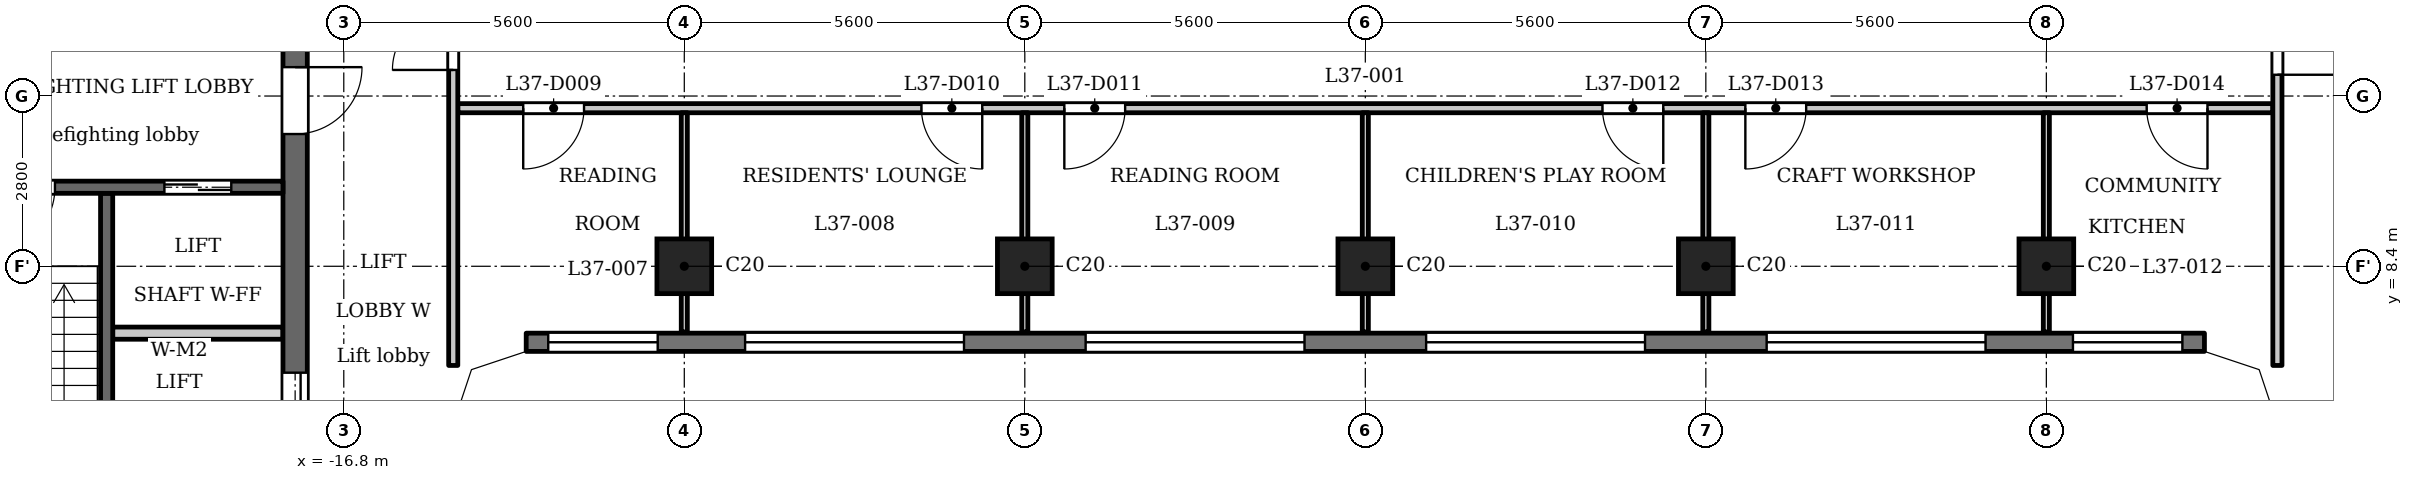
"""IFC4 building model, lengths in metres.
Left out: names, types, materials, properties, quantities, classifications, styles, units other than length and angle.
Written with IfcOpenShell. Run it as: python <this file> out.ifc"""

import sys

from ifc_helpers import new_model, si_unit, direction, frame, frame_2d, origin, origin_2d, place, context, subcontext, project, spatial, polyline, rectangle, outline, extrude, element, fill, save


model = new_model("IFC4")
c1 = context("Model", 3, precision=1e-05, world=origin(), true_north=direction((0.0, 1.0)))
c2 = subcontext(c1, "Body", "Model", "MODEL_VIEW")
j1 = project(units=[si_unit("LENGTHUNIT", "METRE"), si_unit("PLANEANGLEUNIT", "RADIAN")], contexts=[c1])
p1 = place(None, origin())
s1 = spatial("IfcSite", under=j1, at=p1, CompositionType="ELEMENT")
p2 = place(p1, origin())
s2 = spatial("IfcBuilding", under=s1, at=p2, CompositionType="ELEMENT")
p3 = place(p2, frame((0.0, 0.0, 146.6)))
s3 = spatial("IfcBuildingStorey", under=s2, at=p3, CompositionType="ELEMENT", Elevation=146.6)
for number, where, z_axis, x_axis in (
    (1, (-11.2, 8.4, 0.0), (0.0, 0.0, 1.0), (1.0, 0.0, 0.0)),
    (2, (-5.6, 8.4, 0.0), (0.0, 0.0, 1.0), (1.0, 0.0, 0.0)),
    (3, (0.0, 8.4, 0.0), (0.0, 0.0, 1.0), (1.0, 0.0, 0.0)),
    (4, (5.6, 8.4, 0.0), (0.0, 0.0, 1.0), (1.0, 0.0, 0.0)),
    (5, (11.2, 8.4, 0.0), (0.0, 0.0, 1.0), (1.0, 0.0, 0.0)),
):
    element("IfcColumn", number, at=place(p3, frame(where, z_axis=z_axis, x_axis=x_axis)), inside=s3, PredefinedType="COLUMN", context=c2, shape_type="SweptSolid", body=[
        extrude(rectangle(XDim=0.9, YDim=0.9, at=origin_2d()), origin(), (0.0, 0.0, 1.0), 3.5),
    ])
p4 = place(p3, frame((-13.8, 7.15, 0.0), z_axis=(0.0, 0.0, 1.0), x_axis=(1.0, 0.0, 0.0)))
e6 = element("IfcWall", 6, at=p4, inside=s3, PredefinedType="SOLIDWALL", context=c2, shape_type="SweptSolid", body=[
    extrude(rectangle(XDim=27.6, YDim=0.3, at=frame_2d((13.8, 0.0))), origin(), (0.0, 0.0, 1.0), 3.2),
])
p5 = place(p4, frame((0.363, 0.0, 0.9)))
e7 = element("IfcOpeningElement", 7, at=p5, cuts=e6, PredefinedType="OPENING", context=c2, shape_type="SweptSolid", body=[
    extrude(rectangle(XDim=1.8, YDim=1.25, at=frame_2d((0.9, 0.625))), frame((0.0, 0.16, 0.0), z_axis=(0.0, -1.0, 0.0), x_axis=(1.0, 0.0, 0.0)), (0.0, 0.0, 1.0), 0.32),
])
p6 = place(p4, frame((3.6, 0.0, 1.2)))
e8 = element("IfcOpeningElement", 8, at=p6, cuts=e6, PredefinedType="OPENING", context=c2, shape_type="SweptSolid", body=[
    extrude(rectangle(XDim=3.6, YDim=0.95, at=frame_2d((1.8, 0.475))), frame((0.0, 0.16, 0.0), z_axis=(0.0, -1.0, 0.0), x_axis=(1.0, 0.0, 0.0)), (0.0, 0.0, 1.0), 0.32),
])
p7 = place(p4, frame((9.2, 0.0, 1.2)))
e9 = element("IfcOpeningElement", 9, at=p7, cuts=e6, PredefinedType="OPENING", context=c2, shape_type="SweptSolid", body=[
    extrude(rectangle(XDim=3.6, YDim=0.95, at=frame_2d((1.8, 0.475))), frame((0.0, 0.16, 0.0), z_axis=(0.0, -1.0, 0.0), x_axis=(1.0, 0.0, 0.0)), (0.0, 0.0, 1.0), 0.32),
])
p8 = place(p4, frame((14.8, 0.0, 1.2)))
e10 = element("IfcOpeningElement", 10, at=p8, cuts=e6, PredefinedType="OPENING", context=c2, shape_type="SweptSolid", body=[
    extrude(rectangle(XDim=3.6, YDim=0.95, at=frame_2d((1.8, 0.475))), frame((0.0, 0.16, 0.0), z_axis=(0.0, -1.0, 0.0), x_axis=(1.0, 0.0, 0.0)), (0.0, 0.0, 1.0), 0.32),
])
p9 = place(p4, frame((20.4, 0.0, 1.2)))
e11 = element("IfcOpeningElement", 11, at=p9, cuts=e6, PredefinedType="OPENING", context=c2, shape_type="SweptSolid", body=[
    extrude(rectangle(XDim=3.6, YDim=0.95, at=frame_2d((1.8, 0.475))), frame((0.0, 0.16, 0.0), z_axis=(0.0, -1.0, 0.0), x_axis=(1.0, 0.0, 0.0)), (0.0, 0.0, 1.0), 0.32),
])
p10 = place(p4, frame((25.438, 0.0, 0.9)))
e12 = element("IfcOpeningElement", 12, at=p10, cuts=e6, PredefinedType="OPENING", context=c2, shape_type="SweptSolid", body=[
    extrude(rectangle(XDim=1.8, YDim=1.25, at=frame_2d((0.9, 0.625))), frame((0.0, 0.16, 0.0), z_axis=(0.0, -1.0, 0.0), x_axis=(1.0, 0.0, 0.0)), (0.0, 0.0, 1.0), 0.32),
])
p11 = place(p3, frame((-20.7, 2.6, 0.0), z_axis=(0.0, 0.0, 1.0), x_axis=(0.0, 1.0, 0.0)))
e13 = element("IfcWall", 13, at=p11, inside=s3, PredefinedType="SHEAR", context=c2, shape_type="SweptSolid", body=[
    extrude(rectangle(XDim=7.0, YDim=0.2, at=frame_2d((3.5, 0.0))), origin(), (0.0, 0.0, 1.0), 3.2),
])
p12 = place(p3, frame((-17.6, -12.45, 0.0), z_axis=(0.0, 0.0, 1.0), x_axis=(0.0, 1.0, 0.0)))
e14 = element("IfcWall", 14, at=p12, inside=s3, PredefinedType="SHEAR", context=c2, shape_type="SweptSolid", body=[
    extrude(rectangle(XDim=24.9, YDim=0.4, at=frame_2d((12.45, 0.0))), origin(), (0.0, 0.0, 1.0), 3.2),
])
p13 = place(p12, frame((6.325, 0.0, 0.0)))
e15 = element("IfcOpeningElement", 15, at=p13, cuts=e14, PredefinedType="OPENING", context=c2, shape_type="SweptSolid", body=[
    extrude(rectangle(XDim=0.9, YDim=2.1, at=frame_2d((0.45, 1.05))), frame((0.0, 0.21, 0.0), z_axis=(0.0, -1.0, 0.0), x_axis=(1.0, 0.0, 0.0)), (0.0, 0.0, 1.0), 0.42),
])
p14 = place(p12, frame((9.925, 0.0, 0.0)))
e16 = element("IfcOpeningElement", 16, at=p14, cuts=e14, PredefinedType="OPENING", context=c2, shape_type="SweptSolid", body=[
    extrude(rectangle(XDim=0.9, YDim=2.1, at=frame_2d((0.45, 1.05))), frame((0.0, 0.21, 0.0), z_axis=(0.0, -1.0, 0.0), x_axis=(1.0, 0.0, 0.0)), (0.0, 0.0, 1.0), 0.42),
])
p15 = place(p12, frame((15.6, 0.0, 0.0)))
e17 = element("IfcOpeningElement", 17, at=p15, cuts=e14, PredefinedType="OPENING", context=c2, shape_type="SweptSolid", body=[
    extrude(rectangle(XDim=1.1, YDim=2.1, at=frame_2d((0.55, 1.05))), frame((0.0, 0.21, 0.0), z_axis=(0.0, -1.0, 0.0), x_axis=(1.0, 0.0, 0.0)), (0.0, 0.0, 1.0), 0.42),
])
p16 = place(p12, frame((18.0, 0.0, 0.0)))
e18 = element("IfcOpeningElement", 18, at=p16, cuts=e14, PredefinedType="OPENING", context=c2, shape_type="SweptSolid", body=[
    extrude(rectangle(XDim=1.1, YDim=2.1, at=frame_2d((0.55, 1.05))), frame((0.0, 0.21, 0.0), z_axis=(0.0, -1.0, 0.0), x_axis=(1.0, 0.0, 0.0)), (0.0, 0.0, 1.0), 0.42),
])
p17 = place(p12, frame((23.025, 0.0, 0.0)))
e19 = element("IfcOpeningElement", 19, at=p17, cuts=e14, PredefinedType="OPENING", context=c2, shape_type="SweptSolid", body=[
    extrude(rectangle(XDim=1.1, YDim=2.1, at=frame_2d((0.55, 1.05))), frame((0.0, 0.21, 0.0), z_axis=(0.0, -1.0, 0.0), x_axis=(1.0, 0.0, 0.0)), (0.0, 0.0, 1.0), 0.42),
])
p18 = place(p12, frame((0.775, 0.0, 0.0)))
e20 = element("IfcOpeningElement", 20, at=p18, cuts=e14, PredefinedType="OPENING", context=c2, shape_type="SweptSolid", body=[
    extrude(rectangle(XDim=1.1, YDim=2.1, at=frame_2d((0.55, 1.05))), frame((0.0, 0.21, 0.0), z_axis=(0.0, -1.0, 0.0), x_axis=(1.0, 0.0, 0.0)), (0.0, 0.0, 1.0), 0.42),
])
p19 = place(p12, frame((12.925, 0.0, 0.0)))
e21 = element("IfcOpeningElement", 21, at=p19, cuts=e14, PredefinedType="OPENING", context=c2, shape_type="SweptSolid", body=[
    extrude(rectangle(XDim=1.8, YDim=2.1, at=frame_2d((0.9, 1.05))), frame((0.0, 0.21, 0.0), z_axis=(0.0, -1.0, 0.0), x_axis=(1.0, 0.0, 0.0)), (0.0, 0.0, 1.0), 0.42),
])
p20 = place(p3, frame((-17.8, 7.3, 0.0), z_axis=(0.0, 0.0, 1.0), x_axis=(-1.0, 0.0, 0.0)))
e22 = element("IfcWall", 22, at=p20, inside=s3, PredefinedType="PARTITIONING", context=c2, shape_type="SweptSolid", body=[
    extrude(rectangle(XDim=2.8, YDim=0.2, at=frame_2d((1.4, 0.0))), origin(), (0.0, 0.0, 1.0), 3.2),
])
p21 = place(p3, frame((-17.8, 9.7, 0.0), z_axis=(0.0, 0.0, 1.0), x_axis=(-1.0, 0.0, 0.0)))
e23 = element("IfcWall", 23, at=p21, inside=s3, PredefinedType="SHEAR", context=c2, shape_type="SweptSolid", body=[
    extrude(rectangle(XDim=8.45, YDim=0.2, at=frame_2d((4.225, 0.0))), origin(), (0.0, 0.0, 1.0), 3.2),
])
p22 = place(p21, frame((0.85, 0.0, 0.0)))
e24 = element("IfcOpeningElement", 24, at=p22, cuts=e23, PredefinedType="OPENING", context=c2, shape_type="SweptSolid", body=[
    extrude(rectangle(XDim=1.1, YDim=2.1, at=frame_2d((0.55, 1.05))), frame((0.0, 0.11, 0.0), z_axis=(0.0, -1.0, 0.0), x_axis=(1.0, 0.0, 0.0)), (0.0, 0.0, 1.0), 0.22),
])
p23 = place(p21, frame((3.75, 0.0, 0.0)))
e25 = element("IfcOpeningElement", 25, at=p23, cuts=e23, PredefinedType="OPENING", context=c2, shape_type="SweptSolid", body=[
    extrude(rectangle(XDim=1.1, YDim=2.1, at=frame_2d((0.55, 1.05))), frame((0.0, 0.11, 0.0), z_axis=(0.0, -1.0, 0.0), x_axis=(1.0, 0.0, 0.0)), (0.0, 0.0, 1.0), 0.22),
])
p24 = place(p3, frame((-14.925, 11.0, 0.0), z_axis=(0.0, 0.0, 1.0), x_axis=(1.0, 0.0, 0.0)))
e26 = element("IfcWall", 26, at=p24, inside=s3, PredefinedType="PARTITIONING", context=c2, shape_type="SweptSolid", body=[
    extrude(rectangle(XDim=29.85, YDim=0.15, at=frame_2d((14.925, 0.0))), origin(), (0.0, 0.0, 1.0), 3.2),
])
p25 = place(p24, frame((1.076, 0.0, 0.0)))
e27 = element("IfcOpeningElement", 27, at=p25, cuts=e26, PredefinedType="OPENING", context=c2, shape_type="SweptSolid", body=[
    extrude(rectangle(XDim=1.0, YDim=2.1, at=frame_2d((0.5, 1.05))), frame((0.0, 0.085, 0.0), z_axis=(0.0, -1.0, 0.0), x_axis=(1.0, 0.0, 0.0)), (0.0, 0.0, 1.0), 0.17),
])
p26 = place(p24, frame((7.625, 0.0, 0.0)))
e28 = element("IfcOpeningElement", 28, at=p26, cuts=e26, PredefinedType="OPENING", context=c2, shape_type="SweptSolid", body=[
    extrude(rectangle(XDim=1.0, YDim=2.1, at=frame_2d((0.5, 1.05))), frame((0.0, 0.085, 0.0), z_axis=(0.0, -1.0, 0.0), x_axis=(1.0, 0.0, 0.0)), (0.0, 0.0, 1.0), 0.17),
])
p27 = place(p24, frame((9.975, 0.0, 0.0)))
e29 = element("IfcOpeningElement", 29, at=p27, cuts=e26, PredefinedType="OPENING", context=c2, shape_type="SweptSolid", body=[
    extrude(rectangle(XDim=1.0, YDim=2.1, at=frame_2d((0.5, 1.05))), frame((0.0, 0.085, 0.0), z_axis=(0.0, -1.0, 0.0), x_axis=(1.0, 0.0, 0.0)), (0.0, 0.0, 1.0), 0.17),
])
p28 = place(p24, frame((18.825, 0.0, 0.0)))
e30 = element("IfcOpeningElement", 30, at=p28, cuts=e26, PredefinedType="OPENING", context=c2, shape_type="SweptSolid", body=[
    extrude(rectangle(XDim=1.0, YDim=2.1, at=frame_2d((0.5, 1.05))), frame((0.0, 0.085, 0.0), z_axis=(0.0, -1.0, 0.0), x_axis=(1.0, 0.0, 0.0)), (0.0, 0.0, 1.0), 0.17),
])
p29 = place(p24, frame((21.175, 0.0, 0.0)))
e31 = element("IfcOpeningElement", 31, at=p29, cuts=e26, PredefinedType="OPENING", context=c2, shape_type="SweptSolid", body=[
    extrude(rectangle(XDim=1.0, YDim=2.1, at=frame_2d((0.5, 1.05))), frame((0.0, 0.085, 0.0), z_axis=(0.0, -1.0, 0.0), x_axis=(1.0, 0.0, 0.0)), (0.0, 0.0, 1.0), 0.17),
])
p30 = place(p24, frame((27.775, 0.0, 0.0)))
e32 = element("IfcOpeningElement", 32, at=p30, cuts=e26, PredefinedType="OPENING", context=c2, shape_type="SweptSolid", body=[
    extrude(rectangle(XDim=1.0, YDim=2.1, at=frame_2d((0.5, 1.05))), frame((0.0, 0.085, 0.0), z_axis=(0.0, -1.0, 0.0), x_axis=(1.0, 0.0, 0.0)), (0.0, 0.0, 1.0), 0.17),
])
p31 = place(p3, frame((-15.0, 6.769, 0.0), z_axis=(0.0, 0.0, 1.0), x_axis=(0.0, 1.0, 0.0)))
e33 = element("IfcWall", 33, at=p31, inside=s3, PredefinedType="PARTITIONING", context=c2, shape_type="SweptSolid", body=[
    extrude(rectangle(XDim=6.356, YDim=0.15, at=frame_2d((3.178, 0.0))), origin(), (0.0, 0.0, 1.0), 3.2),
])
p32 = place(p31, frame((4.86, 0.0, 0.0)))
e34 = element("IfcOpeningElement", 34, at=p32, cuts=e33, PredefinedType="OPENING", context=c2, shape_type="SweptSolid", body=[
    extrude(rectangle(XDim=1.0, YDim=2.1, at=frame_2d((0.5, 1.05))), frame((0.0, 0.085, 0.0), z_axis=(0.0, -1.0, 0.0), x_axis=(1.0, 0.0, 0.0)), (0.0, 0.0, 1.0), 0.17),
])
for number, where, z_axis, x_axis in (
    (35, (-11.2, 7.32, 0.0), (0.0, 0.0, 1.0), (0.0, 1.0, 0.0)),
    (36, (-5.6, 7.32, 0.0), (0.0, 0.0, 1.0), (0.0, 1.0, 0.0)),
    (37, (0.0, 7.32, 0.0), (0.0, 0.0, 1.0), (0.0, 1.0, 0.0)),
    (38, (5.6, 7.32, 0.0), (0.0, 0.0, 1.0), (0.0, 1.0, 0.0)),
    (39, (11.2, 7.32, 0.0), (0.0, 0.0, 1.0), (0.0, 1.0, 0.0)),
):
    element("IfcWall", number, at=place(p3, frame(where, z_axis=z_axis, x_axis=x_axis)), inside=s3, PredefinedType="PARTITIONING", context=c2, shape_type="SweptSolid", body=[
        extrude(rectangle(XDim=3.605, YDim=0.1, at=frame_2d((1.802, 0.0))), origin(), (0.0, 0.0, 1.0), 3.2),
    ])
p33 = place(p3, frame((15.0, 6.769, 0.0), z_axis=(0.0, 0.0, 1.0), x_axis=(0.0, 1.0, 0.0)))
e40 = element("IfcWall", 40, at=p33, inside=s3, PredefinedType="PARTITIONING", context=c2, shape_type="SweptSolid", body=[
    extrude(rectangle(XDim=6.356, YDim=0.15, at=frame_2d((3.178, 0.0))), origin(), (0.0, 0.0, 1.0), 3.2),
])
p34 = place(p33, frame((4.781, 0.0, 0.0)))
e41 = element("IfcOpeningElement", 41, at=p34, cuts=e40, PredefinedType="OPENING", context=c2, shape_type="SweptSolid", body=[
    extrude(rectangle(XDim=1.0, YDim=2.1, at=frame_2d((0.5, 1.05))), frame((0.0, 0.085, 0.0), z_axis=(0.0, -1.0, 0.0), x_axis=(1.0, 0.0, 0.0)), (0.0, 0.0, 1.0), 0.17),
])
p35 = place(p3, origin())
e42 = element("IfcWall", 42, at=p35, inside=s3, PredefinedType="SOLIDWALL", context=c2, shape_type="SweptSolid", body=[
    extrude(outline(polyline([(-13.849, 7.3), (-14.937, 6.937), (-15.3, 5.849), (-15.3, 5.8), (-15.0, 5.8), (-14.7, 6.7), (-13.8, 7.0), (-13.8, 7.3), (-13.849, 7.3)])), origin(), (0.0, 0.0, 1.0), 3.2),
])
e43 = element("IfcWall", 43, at=p35, inside=s3, PredefinedType="SOLIDWALL", context=c2, shape_type="SweptSolid", body=[
    extrude(outline(polyline([(14.937, 6.937), (13.849, 7.3), (13.8, 7.3), (13.8, 7.0), (14.7, 6.7), (15.0, 5.8), (15.3, 5.8), (15.3, 5.849), (14.937, 6.937)])), origin(), (0.0, 0.0, 1.0), 3.2),
])
p36 = place(p16, origin())
e44 = element("IfcDoor", 44, at=p36, inside=s3, OperationType="DOUBLE_DOOR_SLIDING", PredefinedType="DOOR", context=c2, shape_type="SweptSolid", body=[
    extrude(rectangle(XDim=1.1, YDim=2.1, at=frame_2d((0.55, 1.05))), frame((0.0, 0.025, 0.0), z_axis=(0.0, -1.0, 0.0), x_axis=(1.0, 0.0, 0.0)), (0.0, 0.0, 1.0), 0.05),
])
fill(e18, e44)
p37 = place(p22, origin())
e45 = element("IfcDoor", 45, at=p37, inside=s3, OperationType="DOUBLE_DOOR_SLIDING", PredefinedType="DOOR", context=c2, shape_type="SweptSolid", body=[
    extrude(rectangle(XDim=1.1, YDim=2.1, at=frame_2d((0.55, 1.05))), frame((0.0, 0.025, 0.0), z_axis=(0.0, -1.0, 0.0), x_axis=(1.0, 0.0, 0.0)), (0.0, 0.0, 1.0), 0.05),
])
fill(e24, e45)
p38 = place(p17, origin())
e46 = element("IfcDoor", 46, at=p38, inside=s3, OperationType="SINGLE_SWING_RIGHT", PredefinedType="DOOR", context=c2, shape_type="SweptSolid", body=[
    extrude(rectangle(XDim=1.1, YDim=2.1, at=frame_2d((0.55, 1.05))), frame((0.0, 0.025, 0.0), z_axis=(0.0, -1.0, 0.0), x_axis=(1.0, 0.0, 0.0)), (0.0, 0.0, 1.0), 0.05),
])
fill(e19, e46)
p39 = place(p23, origin())
e47 = element("IfcDoor", 47, at=p39, inside=s3, OperationType="SINGLE_SWING_LEFT", PredefinedType="DOOR", context=c2, shape_type="SweptSolid", body=[
    extrude(rectangle(XDim=1.1, YDim=2.1, at=frame_2d((0.55, 1.05))), frame((0.0, 0.025, 0.0), z_axis=(0.0, -1.0, 0.0), x_axis=(1.0, 0.0, 0.0)), (0.0, 0.0, 1.0), 0.05),
])
fill(e25, e47)
p40 = place(p32, origin())
e48 = element("IfcDoor", 48, at=p40, inside=s3, OperationType="SINGLE_SWING_RIGHT", PredefinedType="DOOR", context=c2, shape_type="SweptSolid", body=[
    extrude(rectangle(XDim=1.0, YDim=2.1, at=frame_2d((0.5, 1.05))), frame((0.0, 0.025, 0.0), z_axis=(0.0, -1.0, 0.0), x_axis=(1.0, 0.0, 0.0)), (0.0, 0.0, 1.0), 0.05),
])
fill(e34, e48)
p41 = place(p34, origin())
e49 = element("IfcDoor", 49, at=p41, inside=s3, OperationType="SINGLE_SWING_LEFT", PredefinedType="DOOR", context=c2, shape_type="SweptSolid", body=[
    extrude(rectangle(XDim=1.0, YDim=2.1, at=frame_2d((0.5, 1.05))), frame((0.0, 0.025, 0.0), z_axis=(0.0, -1.0, 0.0), x_axis=(1.0, 0.0, 0.0)), (0.0, 0.0, 1.0), 0.05),
])
fill(e41, e49)
p42 = place(p25, origin())
e50 = element("IfcDoor", 50, at=p42, inside=s3, OperationType="SINGLE_SWING_LEFT", PredefinedType="DOOR", context=c2, shape_type="SweptSolid", body=[
    extrude(rectangle(XDim=1.0, YDim=2.1, at=frame_2d((0.5, 1.05))), frame((0.0, 0.025, 0.0), z_axis=(0.0, -1.0, 0.0), x_axis=(1.0, 0.0, 0.0)), (0.0, 0.0, 1.0), 0.05),
])
fill(e27, e50)
p43 = place(p26, origin())
e51 = element("IfcDoor", 51, at=p43, inside=s3, OperationType="SINGLE_SWING_RIGHT", PredefinedType="DOOR", context=c2, shape_type="SweptSolid", body=[
    extrude(rectangle(XDim=1.0, YDim=2.1, at=frame_2d((0.5, 1.05))), frame((0.0, 0.025, 0.0), z_axis=(0.0, -1.0, 0.0), x_axis=(1.0, 0.0, 0.0)), (0.0, 0.0, 1.0), 0.05),
])
fill(e28, e51)
p44 = place(p27, origin())
e52 = element("IfcDoor", 52, at=p44, inside=s3, OperationType="SINGLE_SWING_LEFT", PredefinedType="DOOR", context=c2, shape_type="SweptSolid", body=[
    extrude(rectangle(XDim=1.0, YDim=2.1, at=frame_2d((0.5, 1.05))), frame((0.0, 0.025, 0.0), z_axis=(0.0, -1.0, 0.0), x_axis=(1.0, 0.0, 0.0)), (0.0, 0.0, 1.0), 0.05),
])
fill(e29, e52)
p45 = place(p28, origin())
e53 = element("IfcDoor", 53, at=p45, inside=s3, OperationType="SINGLE_SWING_RIGHT", PredefinedType="DOOR", context=c2, shape_type="SweptSolid", body=[
    extrude(rectangle(XDim=1.0, YDim=2.1, at=frame_2d((0.5, 1.05))), frame((0.0, 0.025, 0.0), z_axis=(0.0, -1.0, 0.0), x_axis=(1.0, 0.0, 0.0)), (0.0, 0.0, 1.0), 0.05),
])
fill(e30, e53)
p46 = place(p29, origin())
e54 = element("IfcDoor", 54, at=p46, inside=s3, OperationType="SINGLE_SWING_LEFT", PredefinedType="DOOR", context=c2, shape_type="SweptSolid", body=[
    extrude(rectangle(XDim=1.0, YDim=2.1, at=frame_2d((0.5, 1.05))), frame((0.0, 0.025, 0.0), z_axis=(0.0, -1.0, 0.0), x_axis=(1.0, 0.0, 0.0)), (0.0, 0.0, 1.0), 0.05),
])
fill(e31, e54)
p47 = place(p30, origin())
e55 = element("IfcDoor", 55, at=p47, inside=s3, OperationType="SINGLE_SWING_RIGHT", PredefinedType="DOOR", context=c2, shape_type="SweptSolid", body=[
    extrude(rectangle(XDim=1.0, YDim=2.1, at=frame_2d((0.5, 1.05))), frame((0.0, 0.025, 0.0), z_axis=(0.0, -1.0, 0.0), x_axis=(1.0, 0.0, 0.0)), (0.0, 0.0, 1.0), 0.05),
])
fill(e32, e55)
p48 = place(p5, origin())
e56 = element("IfcWindow", 56, at=p48, inside=s3, PartitioningType="SINGLE_PANEL", PredefinedType="WINDOW", context=c2, shape_type="SweptSolid", body=[
    extrude(rectangle(XDim=1.8, YDim=1.25, at=frame_2d((0.9, 0.625))), frame((0.0, 0.03, 0.0), z_axis=(0.0, -1.0, 0.0), x_axis=(1.0, 0.0, 0.0)), (0.0, 0.0, 1.0), 0.06),
])
fill(e7, e56)
p49 = place(p6, origin())
e57 = element("IfcWindow", 57, at=p49, inside=s3, PartitioningType="SINGLE_PANEL", PredefinedType="WINDOW", context=c2, shape_type="SweptSolid", body=[
    extrude(rectangle(XDim=3.6, YDim=0.95, at=frame_2d((1.8, 0.475))), frame((0.0, 0.03, 0.0), z_axis=(0.0, -1.0, 0.0), x_axis=(1.0, 0.0, 0.0)), (0.0, 0.0, 1.0), 0.06),
])
fill(e8, e57)
p50 = place(p7, origin())
e58 = element("IfcWindow", 58, at=p50, inside=s3, PartitioningType="SINGLE_PANEL", PredefinedType="WINDOW", context=c2, shape_type="SweptSolid", body=[
    extrude(rectangle(XDim=3.6, YDim=0.95, at=frame_2d((1.8, 0.475))), frame((0.0, 0.03, 0.0), z_axis=(0.0, -1.0, 0.0), x_axis=(1.0, 0.0, 0.0)), (0.0, 0.0, 1.0), 0.06),
])
fill(e9, e58)
p51 = place(p8, origin())
e59 = element("IfcWindow", 59, at=p51, inside=s3, PartitioningType="SINGLE_PANEL", PredefinedType="WINDOW", context=c2, shape_type="SweptSolid", body=[
    extrude(rectangle(XDim=3.6, YDim=0.95, at=frame_2d((1.8, 0.475))), frame((0.0, 0.03, 0.0), z_axis=(0.0, -1.0, 0.0), x_axis=(1.0, 0.0, 0.0)), (0.0, 0.0, 1.0), 0.06),
])
fill(e10, e59)
p52 = place(p9, origin())
e60 = element("IfcWindow", 60, at=p52, inside=s3, PartitioningType="SINGLE_PANEL", PredefinedType="WINDOW", context=c2, shape_type="SweptSolid", body=[
    extrude(rectangle(XDim=3.6, YDim=0.95, at=frame_2d((1.8, 0.475))), frame((0.0, 0.03, 0.0), z_axis=(0.0, -1.0, 0.0), x_axis=(1.0, 0.0, 0.0)), (0.0, 0.0, 1.0), 0.06),
])
fill(e11, e60)
p53 = place(p10, origin())
e61 = element("IfcWindow", 61, at=p53, inside=s3, PartitioningType="SINGLE_PANEL", PredefinedType="WINDOW", context=c2, shape_type="SweptSolid", body=[
    extrude(rectangle(XDim=1.8, YDim=1.25, at=frame_2d((0.9, 0.625))), frame((0.0, 0.03, 0.0), z_axis=(0.0, -1.0, 0.0), x_axis=(1.0, 0.0, 0.0)), (0.0, 0.0, 1.0), 0.06),
])
fill(e12, e61)
save(model, sys.argv[1])
